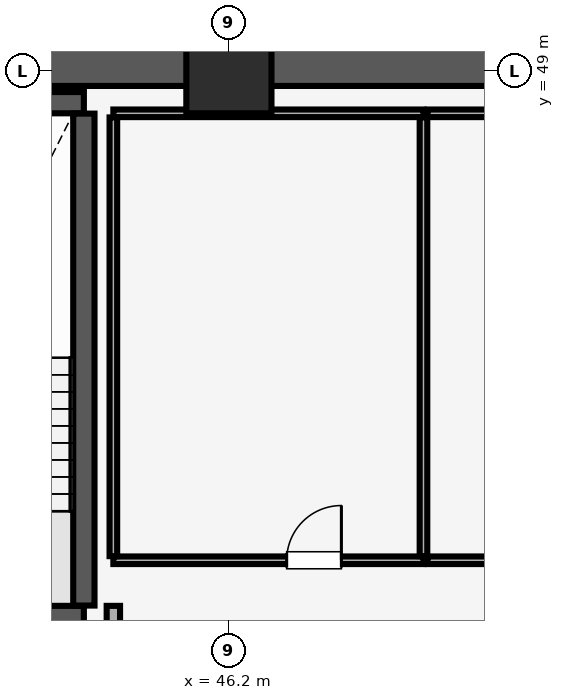
"""IFC4 building model, lengths in metres.
Left out: names, types, materials, properties, quantities, classifications, styles, units other than length and angle.
Written with IfcOpenShell. Run it as: python <this file> out.ifc"""

import sys

from ifc_helpers import new_model, si_unit, direction, frame, frame_2d, origin, origin_2d, place, context, subcontext, project, spatial, rectangle, extrude, element, fill, save


model = new_model("IFC4")
c1 = context("Model", 3, precision=1e-05, world=origin(), true_north=direction((0.0, 1.0)))
c2 = subcontext(c1, "Body", "Model", "MODEL_VIEW")
j1 = project(units=[si_unit("LENGTHUNIT", "METRE"), si_unit("PLANEANGLEUNIT", "RADIAN")], contexts=[c1])
p1 = place(None, origin())
s1 = spatial("IfcSite", under=j1, at=p1, CompositionType="ELEMENT")
p2 = place(p1, origin())
s2 = spatial("IfcBuilding", under=s1, at=p2, CompositionType="ELEMENT")
p3 = place(p2, frame((0.0, 0.0, 19.4)))
s3 = spatial("IfcBuildingStorey", under=s2, at=p3, CompositionType="ELEMENT", Elevation=19.4)
p4 = place(p3, frame((46.2, 49.0, 0.0), z_axis=(0.0, 0.0, 1.0), x_axis=(1.0, 0.0, 0.0)))
e1 = element("IfcColumn", 1, at=p4, inside=s3, PredefinedType="COLUMN", context=c2, shape_type="SweptSolid", body=[
    extrude(rectangle(XDim=1.4, YDim=1.4, at=origin_2d()), origin(), (0.0, 0.0, 1.0), 6.28),
])
p5 = place(p3, frame((16.2, 49.3, 0.0), z_axis=(0.0, 0.0, 1.0), x_axis=(1.0, 0.0, 0.0)))
e2 = element("IfcWall", 2, at=p5, inside=s3, PredefinedType="SHEAR", context=c2, shape_type="SweptSolid", body=[
    extrude(rectangle(XDim=51.6, YDim=1.1, at=frame_2d((25.8, 0.0))), origin(), (0.0, 0.0, 1.0), 6.28),
])
p6 = place(p3, frame((40.185, 40.025, 0.0), z_axis=(0.0, 0.0, 1.0), x_axis=(1.0, 0.0, 0.0)))
e3 = element("IfcWall", 3, at=p6, inside=s3, PredefinedType="SHEAR", context=c2, shape_type="SweptSolid", body=[
    extrude(rectangle(XDim=3.63, YDim=0.35, at=frame_2d((1.815, 0.0))), origin(), (0.0, 0.0, 1.0), 6.28),
])
p7 = place(p6, frame((1.24, 0.0, 0.0)))
e4 = element("IfcOpeningElement", 4, at=p7, cuts=e3, PredefinedType="OPENING", context=c2, shape_type="SweptSolid", body=[
    extrude(rectangle(XDim=1.15, YDim=2.15, at=frame_2d((0.575, 1.075))), frame((0.0, 0.185, 0.0), z_axis=(0.0, -1.0, 0.0), x_axis=(1.0, 0.0, 0.0)), (0.0, 0.0, 1.0), 0.37),
])
p8 = place(p3, frame((40.185, 48.475, 0.0), z_axis=(0.0, 0.0, 1.0), x_axis=(1.0, 0.0, 0.0)))
e5 = element("IfcWall", 5, at=p8, inside=s3, PredefinedType="SHEAR", context=c2, shape_type="SweptSolid", body=[
    extrude(rectangle(XDim=3.63, YDim=0.35, at=frame_2d((1.815, 0.0))), origin(), (0.0, 0.0, 1.0), 6.28),
])
p9 = place(p3, frame((43.815, 40.205, 0.0), z_axis=(0.0, 0.0, 1.0), x_axis=(0.0, 1.0, 0.0)))
e6 = element("IfcWall", 6, at=p9, inside=s3, PredefinedType="SHEAR", context=c2, shape_type="SweptSolid", body=[
    extrude(rectangle(XDim=8.09, YDim=0.35, at=frame_2d((4.045, 0.0))), origin(), (0.0, 0.0, 1.0), 6.28),
])
p10 = place(p3, frame((44.3, 34.415, 0.0), z_axis=(0.0, 0.0, 1.0), x_axis=(0.0, 1.0, 0.0)))
e7 = element("IfcWall", 7, at=p10, inside=s3, PredefinedType="PARTITIONING", context=c2, shape_type="SweptSolid", body=[
    extrude(rectangle(XDim=5.785, YDim=0.22, at=frame_2d((2.893, 0.0))), origin(), (0.0, 0.0, 1.0), 6.28),
])
p11 = place(p3, frame((44.3, 40.95, 0.0), z_axis=(0.0, 0.0, 1.0), x_axis=(1.0, 0.0, 0.0)))
e8 = element("IfcWall", 8, at=p11, inside=s3, PredefinedType="PARTITIONING", context=c2, shape_type="SweptSolid", body=[
    extrude(rectangle(XDim=5.1, YDim=0.125, at=frame_2d((2.55, 0.0))), origin(), (0.0, 0.0, 1.0), 6.28),
])
p12 = place(p11, frame((2.85, 0.0, 0.0)))
e9 = element("IfcOpeningElement", 9, at=p12, cuts=e8, PredefinedType="OPENING", context=c2, shape_type="SweptSolid", body=[
    extrude(rectangle(XDim=0.9, YDim=2.1, at=frame_2d((0.45, 1.05))), frame((0.0, 0.073, 0.0), z_axis=(0.0, -1.0, 0.0), x_axis=(1.0, 0.0, 0.0)), (0.0, 0.0, 1.0), 0.145),
])
p13 = place(p3, frame((44.3, 48.3, 0.0), z_axis=(0.0, 0.0, 1.0), x_axis=(1.0, 0.0, 0.0)))
e10 = element("IfcWall", 10, at=p13, inside=s3, PredefinedType="PARTITIONING", context=c2, shape_type="SweptSolid", body=[
    extrude(rectangle(XDim=5.1, YDim=0.125, at=frame_2d((2.55, 0.0))), origin(), (0.0, 0.0, 1.0), 6.28),
])
for number, where, z_axis, x_axis in (
    (11, (44.3, 41.018, 0.0), (0.0, 0.0, 1.0), (0.0, 1.0, 0.0)),
    (12, (49.4, 41.018, 0.0), (0.0, 0.0, 1.0), (0.0, 1.0, 0.0)),
):
    element("IfcWall", number, at=place(p3, frame(where, z_axis=z_axis, x_axis=x_axis)), inside=s3, PredefinedType="PARTITIONING", context=c2, shape_type="SweptSolid", body=[
        extrude(rectangle(XDim=7.215, YDim=0.125, at=frame_2d((3.607, 0.0))), origin(), (0.0, 0.0, 1.0), 6.28),
    ])
p14 = place(p3, frame((49.468, 40.95, 0.0), z_axis=(0.0, 0.0, 1.0), x_axis=(1.0, 0.0, 0.0)))
e13 = element("IfcWall", 13, at=p14, inside=s3, PredefinedType="PARTITIONING", context=c2, shape_type="SweptSolid", body=[
    extrude(rectangle(XDim=8.032, YDim=0.125, at=frame_2d((4.016, 0.0))), origin(), (0.0, 0.0, 1.0), 6.28),
])
p15 = place(p14, frame((4.782, 0.0, 0.0)))
e14 = element("IfcOpeningElement", 14, at=p15, cuts=e13, PredefinedType="OPENING", context=c2, shape_type="SweptSolid", body=[
    extrude(rectangle(XDim=0.9, YDim=2.1, at=frame_2d((0.45, 1.05))), frame((0.0, 0.073, 0.0), z_axis=(0.0, -1.0, 0.0), x_axis=(1.0, 0.0, 0.0)), (0.0, 0.0, 1.0), 0.145),
])
p16 = place(p3, frame((49.468, 48.3, 0.0), z_axis=(0.0, 0.0, 1.0), x_axis=(1.0, 0.0, 0.0)))
e15 = element("IfcWall", 15, at=p16, inside=s3, PredefinedType="PARTITIONING", context=c2, shape_type="SweptSolid", body=[
    extrude(rectangle(XDim=8.022, YDim=0.125, at=frame_2d((4.011, 0.0))), origin(), (0.0, 0.0, 1.0), 6.28),
])
p17 = place(p12, origin())
e16 = element("IfcDoor", 16, at=p17, inside=s3, OperationType="SINGLE_SWING_RIGHT", PredefinedType="DOOR", context=c2, shape_type="SweptSolid", body=[
    extrude(rectangle(XDim=0.9, YDim=2.1, at=frame_2d((0.45, 1.05))), frame((0.0, 0.025, 0.0), z_axis=(0.0, -1.0, 0.0), x_axis=(1.0, 0.0, 0.0)), (0.0, 0.0, 1.0), 0.05),
])
fill(e9, e16)
save(model, sys.argv[1])
